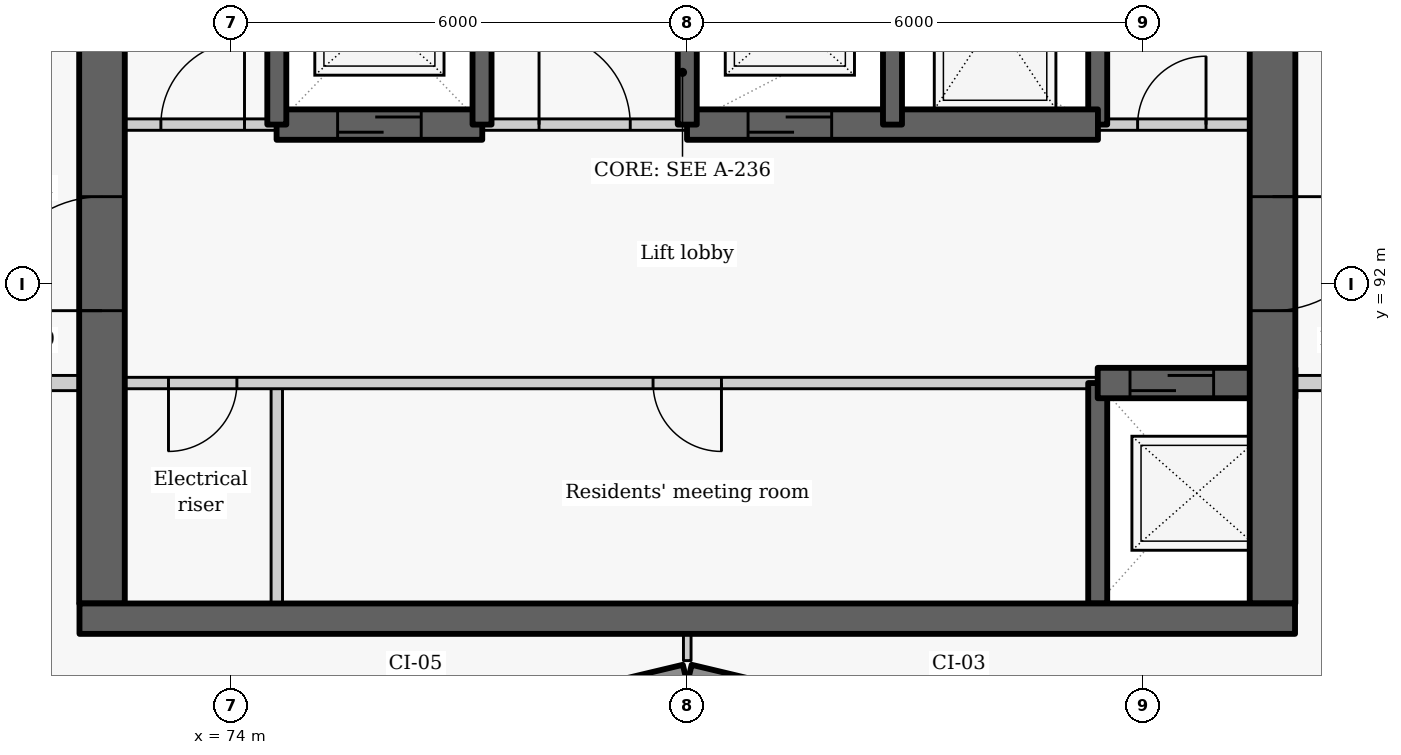
"""IFC4 building model, lengths in metres.
Left out: names, types, materials, properties, quantities, classifications, styles, units other than length and angle.
Written with IfcOpenShell. Run it as: python <this file> out.ifc"""

import sys

from ifc_helpers import new_model, si_unit, direction, frame, frame_2d, origin, place, context, subcontext, project, spatial, rectangle, extrude, element, fill, save


model = new_model("IFC4")
c1 = context("Model", 3, precision=1e-05, world=origin(), true_north=direction((0.0, 1.0)))
c2 = subcontext(c1, "Body", "Model", "MODEL_VIEW")
j1 = project(units=[si_unit("LENGTHUNIT", "METRE"), si_unit("PLANEANGLEUNIT", "RADIAN")], contexts=[c1])
p1 = place(None, origin())
s1 = spatial("IfcSite", under=j1, at=p1, CompositionType="ELEMENT")
p2 = place(p1, origin())
s2 = spatial("IfcBuilding", under=s1, at=p2, CompositionType="ELEMENT")
p3 = place(p2, frame((0.0, 0.0, 213.0)))
s3 = spatial("IfcBuildingStorey", under=s2, at=p3, CompositionType="ELEMENT", Elevation=213.0)
p4 = place(p3, frame((76.814, 86.119, 0.0), z_axis=(0.0, 0.0, 1.0), x_axis=(0.972773113459, 0.231759508395, 0.0)))
e1 = element("IfcWall", 1, at=p4, inside=s3, PredefinedType="SOLIDWALL", context=c2, shape_type="SweptSolid", body=[
    extrude(rectangle(XDim=3.246, YDim=0.25, at=frame_2d((1.623, 0.0))), origin(), (0.0, 0.0, 1.0), 2.425),
])
p5 = place(p4, frame((0.573, 0.0, 0.9)))
e2 = element("IfcOpeningElement", 2, at=p5, cuts=e1, PredefinedType="OPENING", context=c2, shape_type="SweptSolid", body=[
    extrude(rectangle(XDim=2.1, YDim=1.1, at=frame_2d((1.05, 0.55))), frame((0.0, 0.135, 0.0), z_axis=(0.0, -1.0, 0.0), x_axis=(1.0, 0.0, 0.0)), (0.0, 0.0, 1.0), 0.27),
])
p6 = place(p3, frame((80.029, 86.872, 0.0), z_axis=(0.0, 0.0, 1.0), x_axis=(0.972773113459, -0.231759508395, 0.0)))
e3 = element("IfcWall", 3, at=p6, inside=s3, PredefinedType="SOLIDWALL", context=c2, shape_type="SweptSolid", body=[
    extrude(rectangle(XDim=3.246, YDim=0.25, at=frame_2d((1.623, 0.0))), origin(), (0.0, 0.0, 1.0), 2.425),
])
p7 = place(p6, frame((0.573, 0.0, 0.9)))
e4 = element("IfcOpeningElement", 4, at=p7, cuts=e3, PredefinedType="OPENING", context=c2, shape_type="SweptSolid", body=[
    extrude(rectangle(XDim=2.1, YDim=1.1, at=frame_2d((1.05, 0.55))), frame((0.0, 0.135, 0.0), z_axis=(0.0, -1.0, 0.0), x_axis=(1.0, 0.0, 0.0)), (0.0, 0.0, 1.0), 0.27),
])
p8 = place(p3, frame((74.6, 87.8, 0.0), z_axis=(0.0, 0.0, 1.0), x_axis=(0.0, 1.0, 0.0)))
e5 = element("IfcWall", 5, at=p8, inside=s3, PredefinedType="PARTITIONING", context=c2, shape_type="SweptSolid", body=[
    extrude(rectangle(XDim=2.9, YDim=0.15, at=frame_2d((1.45, 0.0))), origin(), (0.0, 0.0, 1.0), 3.025),
])
p9 = place(p3, frame((85.4, 90.7, 0.0), z_axis=(0.0, 0.0, 1.0), x_axis=(-1.0, 0.0, 0.0)))
e6 = element("IfcWall", 6, at=p9, inside=s3, PredefinedType="PARTITIONING", context=c2, shape_type="SweptSolid", body=[
    extrude(rectangle(XDim=13.4, YDim=0.15, at=frame_2d((6.7, 0.0))), origin(), (0.0, 0.0, 1.0), 3.025),
])
p10 = place(p9, frame((11.325, 0.0, 0.0)))
e7 = element("IfcOpeningElement", 7, at=p10, cuts=e6, PredefinedType="OPENING", context=c2, shape_type="SweptSolid", body=[
    extrude(rectangle(XDim=0.9, YDim=2.1, at=frame_2d((0.45, 1.05))), frame((0.0, 0.085, 0.0), z_axis=(0.0, -1.0, 0.0), x_axis=(1.0, 0.0, 0.0)), (0.0, 0.0, 1.0), 0.17),
])
p11 = place(p9, frame((4.95, 0.0, 0.0)))
e8 = element("IfcOpeningElement", 8, at=p11, cuts=e6, PredefinedType="OPENING", context=c2, shape_type="SweptSolid", body=[
    extrude(rectangle(XDim=0.9, YDim=2.1, at=frame_2d((0.45, 1.05))), frame((0.0, 0.085, 0.0), z_axis=(0.0, -1.0, 0.0), x_axis=(1.0, 0.0, 0.0)), (0.0, 0.0, 1.0), 0.17),
])
p12 = place(p3, frame((72.3, 87.8, -0.275), z_axis=(0.0, 0.0, 1.0), x_axis=(0.0, 1.0, 0.0)))
e9 = element("IfcWall", 9, at=p12, inside=s3, PredefinedType="SHEAR", context=c2, shape_type="SweptSolid", body=[
    extrude(rectangle(XDim=9.1, YDim=0.6, at=frame_2d((4.55, 0.0))), origin(), (0.0, 0.0, 1.0), 3.3),
])
p13 = place(p12, frame((3.852, 0.0, 0.275)))
e10 = element("IfcOpeningElement", 10, at=p13, cuts=e9, PredefinedType="OPENING", context=c2, shape_type="SweptSolid", body=[
    extrude(rectangle(XDim=1.5, YDim=2.1, at=frame_2d((0.75, 1.05))), frame((0.0, 0.31, 0.0), z_axis=(0.0, -1.0, 0.0), x_axis=(1.0, 0.0, 0.0)), (0.0, 0.0, 1.0), 0.62),
])
p14 = place(p3, frame((85.4, 87.8, -0.275), z_axis=(0.0, 0.0, 1.0), x_axis=(0.0, 1.0, 0.0)))
e11 = element("IfcWall", 11, at=p14, inside=s3, PredefinedType="SHEAR", context=c2, shape_type="SweptSolid", body=[
    extrude(rectangle(XDim=2.9, YDim=0.25, at=frame_2d((1.45, 0.0))), origin(), (0.0, 0.0, 1.0), 3.3),
])
p15 = place(p3, frame((85.4, 94.1, -0.275), z_axis=(0.0, 0.0, 1.0), x_axis=(0.0, 1.0, 0.0)))
e12 = element("IfcWall", 12, at=p15, inside=s3, PredefinedType="SHEAR", context=c2, shape_type="SweptSolid", body=[
    extrude(rectangle(XDim=2.8, YDim=0.25, at=frame_2d((1.4, 0.0))), origin(), (0.0, 0.0, 1.0), 3.3),
])
p16 = place(p3, frame((85.4, 90.7, -0.275), z_axis=(0.0, 0.0, 1.0), x_axis=(1.0, 0.0, 0.0)))
e13 = element("IfcWall", 13, at=p16, inside=s3, PredefinedType="SHEAR", context=c2, shape_type="SweptSolid", body=[
    extrude(rectangle(XDim=2.6, YDim=0.4, at=frame_2d((1.3, 0.0))), origin(), (0.0, 0.0, 1.0), 3.3),
])
p17 = place(p16, frame((0.425, 0.0, 0.275)))
e14 = element("IfcOpeningElement", 14, at=p17, cuts=e13, PredefinedType="OPENING", context=c2, shape_type="SweptSolid", body=[
    extrude(rectangle(XDim=1.1, YDim=2.1, at=frame_2d((0.55, 1.05))), frame((0.0, 0.21, 0.0), z_axis=(0.0, -1.0, 0.0), x_axis=(1.0, 0.0, 0.0)), (0.0, 0.0, 1.0), 0.42),
])
p18 = place(p3, frame((87.7, 102.05, -0.275), z_axis=(0.0, 0.0, 1.0), x_axis=(0.0, -1.0, 0.0)))
e15 = element("IfcWall", 15, at=p18, inside=s3, PredefinedType="SHEAR", context=c2, shape_type="SweptSolid", body=[
    extrude(rectangle(XDim=14.25, YDim=0.6, at=frame_2d((7.125, 0.0))), origin(), (0.0, 0.0, 1.0), 3.3),
])
p19 = place(p18, frame((8.898, 0.0, 0.275)))
e16 = element("IfcOpeningElement", 16, at=p19, cuts=e15, PredefinedType="OPENING", context=c2, shape_type="SweptSolid", body=[
    extrude(rectangle(XDim=1.5, YDim=2.1, at=frame_2d((0.75, 1.05))), frame((0.0, 0.31, 0.0), z_axis=(0.0, -1.0, 0.0), x_axis=(1.0, 0.0, 0.0)), (0.0, 0.0, 1.0), 0.62),
])
p20 = place(p3, frame((72.0, 94.1, 0.0), z_axis=(0.0, 0.0, 1.0), x_axis=(1.0, 0.0, 0.0)))
e17 = element("IfcWall", 17, at=p20, inside=s3, PredefinedType="PARTITIONING", context=c2, shape_type="SweptSolid", body=[
    extrude(rectangle(XDim=2.603, YDim=0.15, at=frame_2d((1.302, 0.0))), origin(), (0.0, 0.0, 1.0), 3.025),
])
p21 = place(p20, frame((1.075, 0.0, 0.0)))
e18 = element("IfcOpeningElement", 18, at=p21, cuts=e17, PredefinedType="OPENING", context=c2, shape_type="SweptSolid", body=[
    extrude(rectangle(XDim=1.1, YDim=2.1, at=frame_2d((0.55, 1.05))), frame((0.0, 0.085, 0.0), z_axis=(0.0, -1.0, 0.0), x_axis=(1.0, 0.0, 0.0)), (0.0, 0.0, 1.0), 0.17),
])
p22 = place(p3, frame((77.297, 94.1, 0.0), z_axis=(0.0, 0.0, 1.0), x_axis=(1.0, 0.0, 0.0)))
e19 = element("IfcWall", 19, at=p22, inside=s3, PredefinedType="PARTITIONING", context=c2, shape_type="SweptSolid", body=[
    extrude(rectangle(XDim=2.706, YDim=0.15, at=frame_2d((1.353, 0.0))), origin(), (0.0, 0.0, 1.0), 3.025),
])
p23 = place(p22, frame((0.753, 0.0, 0.0)))
e20 = element("IfcOpeningElement", 20, at=p23, cuts=e19, PredefinedType="OPENING", context=c2, shape_type="SweptSolid", body=[
    extrude(rectangle(XDim=1.2, YDim=2.1, at=frame_2d((0.6, 1.05))), frame((0.0, 0.085, 0.0), z_axis=(0.0, -1.0, 0.0), x_axis=(1.0, 0.0, 0.0)), (0.0, 0.0, 1.0), 0.17),
])
p24 = place(p3, frame((85.397, 94.1, 0.0), z_axis=(0.0, 0.0, 1.0), x_axis=(1.0, 0.0, 0.0)))
e21 = element("IfcWall", 21, at=p24, inside=s3, PredefinedType="PARTITIONING", context=c2, shape_type="SweptSolid", body=[
    extrude(rectangle(XDim=2.603, YDim=0.15, at=frame_2d((1.302, 0.0))), origin(), (0.0, 0.0, 1.0), 3.025),
])
p25 = place(p24, frame((0.528, 0.0, 0.0)))
e22 = element("IfcOpeningElement", 22, at=p25, cuts=e21, PredefinedType="OPENING", context=c2, shape_type="SweptSolid", body=[
    extrude(rectangle(XDim=0.9, YDim=2.1, at=frame_2d((0.45, 1.05))), frame((0.0, 0.085, 0.0), z_axis=(0.0, -1.0, 0.0), x_axis=(1.0, 0.0, 0.0)), (0.0, 0.0, 1.0), 0.17),
])
p26 = place(p3, frame((74.597, 94.1, -0.275), z_axis=(0.0, 0.0, 1.0), x_axis=(1.0, 0.0, 0.0)))
e23 = element("IfcWall", 23, at=p26, inside=s3, PredefinedType="SHEAR", context=c2, shape_type="SweptSolid", body=[
    extrude(rectangle(XDim=2.706, YDim=0.4, at=frame_2d((1.353, 0.0))), origin(), (0.0, 0.0, 1.0), 3.3),
])
p27 = place(p26, frame((0.803, 0.0, 0.275)))
e24 = element("IfcOpeningElement", 24, at=p27, cuts=e23, PredefinedType="OPENING", context=c2, shape_type="SweptSolid", body=[
    extrude(rectangle(XDim=1.1, YDim=2.1, at=frame_2d((0.55, 1.05))), frame((0.0, 0.21, 0.0), z_axis=(0.0, -1.0, 0.0), x_axis=(1.0, 0.0, 0.0)), (0.0, 0.0, 1.0), 0.42),
])
p28 = place(p3, frame((79.997, 94.1, -0.275), z_axis=(0.0, 0.0, 1.0), x_axis=(1.0, 0.0, 0.0)))
e25 = element("IfcWall", 25, at=p28, inside=s3, PredefinedType="SHEAR", context=c2, shape_type="SweptSolid", body=[
    extrude(rectangle(XDim=5.406, YDim=0.4, at=frame_2d((2.703, 0.0))), origin(), (0.0, 0.0, 1.0), 3.3),
])
p29 = place(p28, frame((0.803, 0.0, 0.275)))
e26 = element("IfcOpeningElement", 26, at=p29, cuts=e25, PredefinedType="OPENING", context=c2, shape_type="SweptSolid", body=[
    extrude(rectangle(XDim=1.1, YDim=2.1, at=frame_2d((0.55, 1.05))), frame((0.0, 0.21, 0.0), z_axis=(0.0, -1.0, 0.0), x_axis=(1.0, 0.0, 0.0)), (0.0, 0.0, 1.0), 0.42),
])
for number, where, z_axis, x_axis in (
    (27, (74.6, 94.1, -0.275), (0.0, 0.0, 1.0), (0.0, 1.0, 0.0)),
    (28, (77.3, 94.1, -0.275), (0.0, 0.0, 1.0), (0.0, 1.0, 0.0)),
    (29, (80.0, 94.1, -0.275), (0.0, 0.0, 1.0), (0.0, 1.0, 0.0)),
    (30, (82.7, 94.1, -0.275), (0.0, 0.0, 1.0), (0.0, 1.0, 0.0)),
):
    element("IfcWall", number, at=place(p3, frame(where, z_axis=z_axis, x_axis=x_axis)), inside=s3, PredefinedType="SHEAR", context=c2, shape_type="SweptSolid", body=[
        extrude(rectangle(XDim=2.8, YDim=0.25, at=frame_2d((1.4, 0.0))), origin(), (0.0, 0.0, 1.0), 3.3),
    ])
for number, where, z_axis, x_axis in (
    (31, (70.45, 90.7, 0.0), (0.0, 0.0, 1.0), (1.0, 0.0, 0.0)),
    (32, (88.0, 90.7, 0.0), (0.0, 0.0, 1.0), (1.0, 0.0, 0.0)),
):
    element("IfcWall", number, at=place(p3, frame(where, z_axis=z_axis, x_axis=x_axis)), inside=s3, PredefinedType="PARTITIONING", context=c2, shape_type="SweptSolid", body=[
        extrude(rectangle(XDim=1.55, YDim=0.2, at=frame_2d((0.775, 0.0))), origin(), (0.0, 0.0, 1.0), 3.025),
    ])
p30 = place(p3, frame((80.0, 87.048, 0.0), z_axis=(0.0, 0.0, 1.0), x_axis=(0.0, 1.0, 0.0)))
e33 = element("IfcWall", 33, at=p30, inside=s3, PredefinedType="PARTITIONING", context=c2, shape_type="SweptSolid", body=[
    extrude(rectangle(XDim=0.352, YDim=0.1, at=frame_2d((0.176, 0.0))), origin(), (0.0, 0.0, 1.0), 3.025),
])
p31 = place(p3, frame((72.004, 87.6, -0.275), z_axis=(0.0, 0.0, 1.0), x_axis=(1.0, 0.0, 0.0)))
e34 = element("IfcWall", 34, at=p31, inside=s3, PredefinedType="SHEAR", context=c2, shape_type="SweptSolid", body=[
    extrude(rectangle(XDim=15.992, YDim=0.4, at=frame_2d((7.996, 0.0))), origin(), (0.0, 0.0, 1.0), 3.3),
])
p32 = place(p10, origin())
e35 = element("IfcDoor", 35, at=p32, inside=s3, OperationType="SINGLE_SWING_RIGHT", PredefinedType="DOOR", context=c2, shape_type="SweptSolid", body=[
    extrude(rectangle(XDim=0.9, YDim=2.1, at=frame_2d((0.45, 1.05))), frame((0.0, 0.025, 0.0), z_axis=(0.0, -1.0, 0.0), x_axis=(1.0, 0.0, 0.0)), (0.0, 0.0, 1.0), 0.05),
])
fill(e7, e35)
p33 = place(p17, origin())
e36 = element("IfcDoor", 36, at=p33, inside=s3, OperationType="SLIDING_TO_LEFT", PredefinedType="DOOR", context=c2, shape_type="SweptSolid", body=[
    extrude(rectangle(XDim=1.1, YDim=2.1, at=frame_2d((0.55, 1.05))), frame((0.0, 0.025, 0.0), z_axis=(0.0, -1.0, 0.0), x_axis=(1.0, 0.0, 0.0)), (0.0, 0.0, 1.0), 0.05),
])
fill(e14, e36)
p34 = place(p11, origin())
e37 = element("IfcDoor", 37, at=p34, inside=s3, OperationType="SINGLE_SWING_LEFT", PredefinedType="DOOR", context=c2, shape_type="SweptSolid", body=[
    extrude(rectangle(XDim=0.9, YDim=2.1, at=frame_2d((0.45, 1.05))), frame((0.0, 0.025, 0.0), z_axis=(0.0, -1.0, 0.0), x_axis=(1.0, 0.0, 0.0)), (0.0, 0.0, 1.0), 0.05),
])
fill(e8, e37)
p35 = place(p21, origin())
e38 = element("IfcDoor", 38, at=p35, inside=s3, OperationType="SINGLE_SWING_RIGHT", PredefinedType="DOOR", context=c2, shape_type="SweptSolid", body=[
    extrude(rectangle(XDim=1.1, YDim=2.1, at=frame_2d((0.55, 1.05))), frame((0.0, 0.025, 0.0), z_axis=(0.0, -1.0, 0.0), x_axis=(1.0, 0.0, 0.0)), (0.0, 0.0, 1.0), 0.05),
])
fill(e18, e38)
p36 = place(p27, origin())
e39 = element("IfcDoor", 39, at=p36, inside=s3, OperationType="SLIDING_TO_LEFT", PredefinedType="DOOR", context=c2, shape_type="SweptSolid", body=[
    extrude(rectangle(XDim=1.1, YDim=2.1, at=frame_2d((0.55, 1.05))), frame((0.0, 0.025, 0.0), z_axis=(0.0, -1.0, 0.0), x_axis=(1.0, 0.0, 0.0)), (0.0, 0.0, 1.0), 0.05),
])
fill(e24, e39)
p37 = place(p23, origin())
e40 = element("IfcDoor", 40, at=p37, inside=s3, OperationType="DOUBLE_DOOR_SINGLE_SWING", PredefinedType="DOOR", context=c2, shape_type="SweptSolid", body=[
    extrude(rectangle(XDim=1.2, YDim=2.1, at=frame_2d((0.6, 1.05))), frame((0.0, 0.025, 0.0), z_axis=(0.0, -1.0, 0.0), x_axis=(1.0, 0.0, 0.0)), (0.0, 0.0, 1.0), 0.05),
])
fill(e20, e40)
p38 = place(p29, origin())
e41 = element("IfcDoor", 41, at=p38, inside=s3, OperationType="SLIDING_TO_LEFT", PredefinedType="DOOR", context=c2, shape_type="SweptSolid", body=[
    extrude(rectangle(XDim=1.1, YDim=2.1, at=frame_2d((0.55, 1.05))), frame((0.0, 0.025, 0.0), z_axis=(0.0, -1.0, 0.0), x_axis=(1.0, 0.0, 0.0)), (0.0, 0.0, 1.0), 0.05),
])
fill(e26, e41)
p39 = place(p25, origin())
e42 = element("IfcDoor", 42, at=p39, inside=s3, OperationType="SINGLE_SWING_RIGHT", PredefinedType="DOOR", context=c2, shape_type="SweptSolid", body=[
    extrude(rectangle(XDim=0.9, YDim=2.1, at=frame_2d((0.45, 1.05))), frame((0.0, 0.025, 0.0), z_axis=(0.0, -1.0, 0.0), x_axis=(1.0, 0.0, 0.0)), (0.0, 0.0, 1.0), 0.05),
])
fill(e22, e42)
p40 = place(p19, origin())
e43 = element("IfcDoor", 43, at=p40, inside=s3, OperationType="DOUBLE_DOOR_SINGLE_SWING", PredefinedType="DOOR", context=c2, shape_type="SweptSolid", body=[
    extrude(rectangle(XDim=1.5, YDim=2.1, at=frame_2d((0.75, 1.05))), frame((0.0, 0.025, 0.0), z_axis=(0.0, -1.0, 0.0), x_axis=(1.0, 0.0, 0.0)), (0.0, 0.0, 1.0), 0.05),
])
fill(e16, e43)
p41 = place(p13, origin())
e44 = element("IfcDoor", 44, at=p41, inside=s3, OperationType="DOUBLE_DOOR_SINGLE_SWING", PredefinedType="DOOR", context=c2, shape_type="SweptSolid", body=[
    extrude(rectangle(XDim=1.5, YDim=2.1, at=frame_2d((0.75, 1.05))), frame((0.0, 0.025, 0.0), z_axis=(0.0, -1.0, 0.0), x_axis=(1.0, 0.0, 0.0)), (0.0, 0.0, 1.0), 0.05),
])
fill(e10, e44)
save(model, sys.argv[1])
